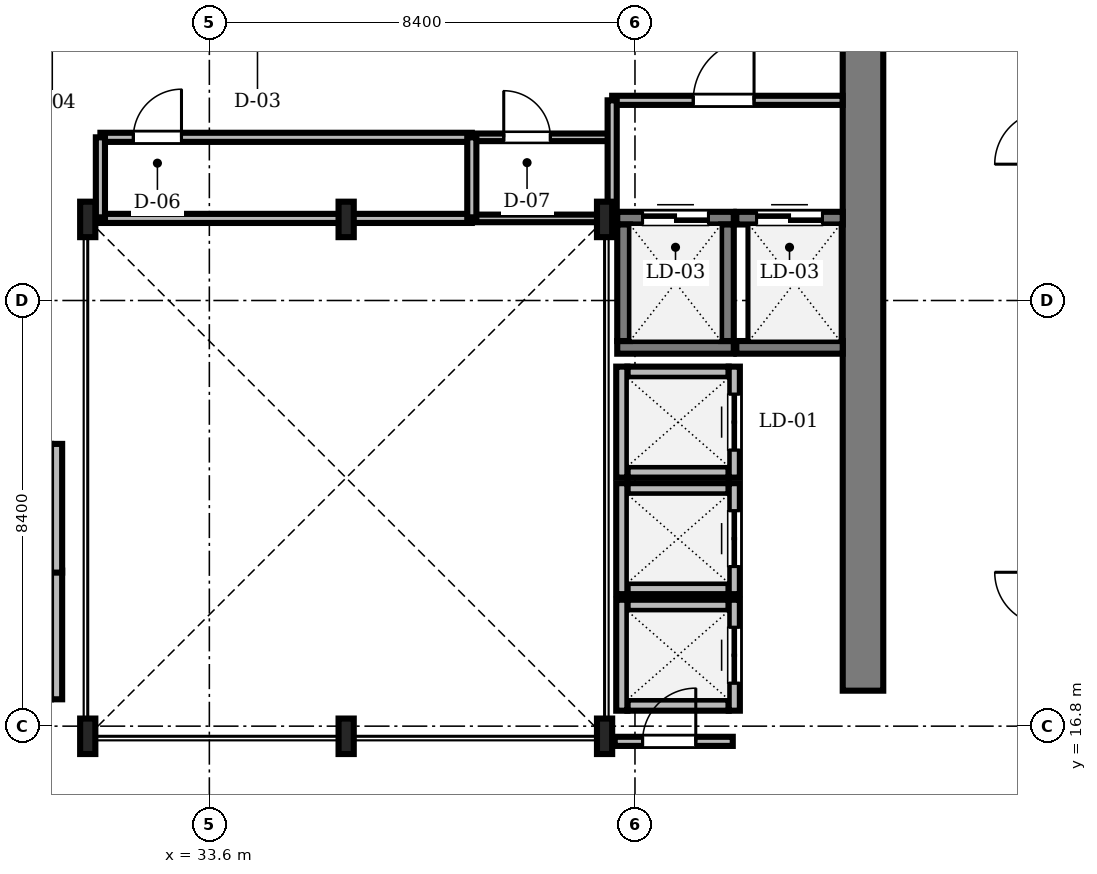
"""IFC4 building model, lengths in metres.
Left out: names, types, materials, properties, quantities, classifications, styles, units other than length and angle.
Written with IfcOpenShell. Run it as: python <this file> out.ifc"""

import sys

from ifc_helpers import new_model, si_unit, direction, frame, frame_2d, origin, origin_2d, place, context, subcontext, project, spatial, rectangle, i_section, extrude, source, transform, mapped, element, fill, save


model = new_model("IFC4")
c1 = context("Model", 3, precision=1e-05, world=origin(), true_north=direction((0.0, 1.0)))
c2 = subcontext(c1, "Body", "Model", "MODEL_VIEW")
j1 = project(units=[si_unit("LENGTHUNIT", "METRE"), si_unit("PLANEANGLEUNIT", "RADIAN")], contexts=[c1])
p1 = place(None, origin())
s1 = spatial("IfcSite", under=j1, at=p1, CompositionType="ELEMENT")
p2 = place(p1, origin())
s2 = spatial("IfcBuilding", under=s1, at=p2, CompositionType="ELEMENT")
p3 = place(p2, frame((0.0, 0.0, 222.3)))
s3 = spatial("IfcBuildingStorey", under=s2, at=p3, CompositionType="ELEMENT", Elevation=222.3)
m1 = source(origin(), c2, "Body", "SweptSolid", [
    extrude(rectangle(XDim=13.15, YDim=0.8, at=frame_2d((6.575, 0.0))), origin(), (0.0, 0.0, 1.0), 3.53),
])
p4 = place(p3, frame((46.5, 17.5, 0.0), z_axis=(0.0, 0.0, 1.0), x_axis=(0.0, 1.0, 0.0)))
e1 = element("IfcWall", 1, at=p4, inside=s3, PredefinedType="SHEAR", context=c2, shape_type="MappedRepresentation", body=[
    mapped(m1, transform((0.0, 0.0, 0.0), scale=1.0)),
])
m2 = source(origin(), c2, "Body", "SweptSolid", [
    extrude(i_section(OverallWidth=0.3, OverallDepth=0.7, WebThickness=0.017, FlangeThickness=0.032, FilletRadius=0.027, at=origin_2d()), origin(), (0.0, 0.0, 1.0), 3.53),
])
for number, where, z_axis, x_axis in (
    (2, (31.2, 16.6, 0.0), (0.0, 0.0, 1.0), (1.0, 0.0, 0.0)),
    (3, (36.3, 16.6, 0.0), (0.0, 0.0, 1.0), (1.0, 0.0, 0.0)),
    (4, (41.4, 16.6, 0.0), (0.0, 0.0, 1.0), (1.0, 0.0, 0.0)),
    (5, (41.4, 26.8, 0.0), (0.0, 0.0, 1.0), (1.0, 0.0, 0.0)),
    (6, (36.3, 26.8, 0.0), (0.0, 0.0, 1.0), (1.0, 0.0, 0.0)),
    (7, (31.2, 26.8, 0.0), (0.0, 0.0, 1.0), (1.0, 0.0, 0.0)),
):
    element("IfcColumn", number, at=place(p3, frame(where, z_axis=z_axis, x_axis=x_axis)), inside=s3, PredefinedType="COLUMN", context=c2, shape_type="MappedRepresentation", body=[
        mapped(m2, transform((0.0, 0.0, 0.0), scale=1.0)),
    ])
m3 = source(origin(), c2, "Body", "SweptSolid", [
    extrude(rectangle(XDim=2.0, YDim=0.22, at=frame_2d((1.0, 0.0))), origin(), (0.0, 0.0, 1.0), 3.53),
])
for number, where, z_axis, x_axis in (
    (8, (41.85, 21.815, 0.0), (0.0, 0.0, 1.0), (1.0, 0.0, 0.0)),
    (9, (41.85, 23.785, 0.0), (0.0, 0.0, 1.0), (1.0, 0.0, 0.0)),
):
    element("IfcWall", number, at=place(p3, frame(where, z_axis=z_axis, x_axis=x_axis)), inside=s3, PredefinedType="SOLIDWALL", context=c2, shape_type="MappedRepresentation", body=[
        mapped(m3, transform((0.0, 0.0, 0.0), scale=1.0)),
    ])
m4 = source(origin(), c2, "Body", "SweptSolid", [
    extrude(rectangle(XDim=2.19, YDim=0.22, at=frame_2d((1.095, 0.0))), origin(), (0.0, 0.0, 1.0), 3.53),
])
p5 = place(p3, frame((41.74, 21.705, 0.0), z_axis=(0.0, 0.0, 1.0), x_axis=(0.0, 1.0, 0.0)))
e10 = element("IfcWall", 10, at=p5, inside=s3, PredefinedType="SOLIDWALL", context=c2, shape_type="MappedRepresentation", body=[
    mapped(m4, transform((0.0, 0.0, 0.0), scale=1.0)),
])
p6 = place(p3, frame((43.96, 21.705, 0.0), z_axis=(0.0, 0.0, 1.0), x_axis=(0.0, 1.0, 0.0)))
e11 = element("IfcWall", 11, at=p6, inside=s3, PredefinedType="SOLIDWALL", context=c2, shape_type="MappedRepresentation", body=[
    mapped(m4, transform((0.0, 0.0, 0.0), scale=1.0)),
])
m5 = source(origin(), c2, "Body", "SweptSolid", [
    extrude(rectangle(XDim=1.1, YDim=2.2, at=frame_2d((0.55, 1.1))), frame((0.0, 0.12, 0.0), z_axis=(0.0, -1.0, 0.0), x_axis=(1.0, 0.0, 0.0)), (0.0, 0.0, 1.0), 0.24),
])
p7 = place(p6, frame((0.545, 0.0, 0.0)))
e12 = element("IfcOpeningElement", 12, at=p7, cuts=e11, PredefinedType="OPENING", context=c2, shape_type="MappedRepresentation", body=[
    mapped(m5, transform((0.0, 0.0, 0.0), scale=1.0)),
])
for number, where, z_axis, x_axis in (
    (13, (41.85, 19.515, 0.0), (0.0, 0.0, 1.0), (1.0, 0.0, 0.0)),
    (14, (41.85, 21.485, 0.0), (0.0, 0.0, 1.0), (1.0, 0.0, 0.0)),
):
    element("IfcWall", number, at=place(p3, frame(where, z_axis=z_axis, x_axis=x_axis)), inside=s3, PredefinedType="SOLIDWALL", context=c2, shape_type="MappedRepresentation", body=[
        mapped(m3, transform((0.0, 0.0, 0.0), scale=1.0)),
    ])
p8 = place(p3, frame((41.74, 19.405, 0.0), z_axis=(0.0, 0.0, 1.0), x_axis=(0.0, 1.0, 0.0)))
e15 = element("IfcWall", 15, at=p8, inside=s3, PredefinedType="SOLIDWALL", context=c2, shape_type="MappedRepresentation", body=[
    mapped(m4, transform((0.0, 0.0, 0.0), scale=1.0)),
])
p9 = place(p3, frame((43.96, 19.405, 0.0), z_axis=(0.0, 0.0, 1.0), x_axis=(0.0, 1.0, 0.0)))
e16 = element("IfcWall", 16, at=p9, inside=s3, PredefinedType="SOLIDWALL", context=c2, shape_type="MappedRepresentation", body=[
    mapped(m4, transform((0.0, 0.0, 0.0), scale=1.0)),
])
p10 = place(p9, frame((0.545, 0.0, 0.0)))
e17 = element("IfcOpeningElement", 17, at=p10, cuts=e16, PredefinedType="OPENING", context=c2, shape_type="MappedRepresentation", body=[
    mapped(m5, transform((0.0, 0.0, 0.0), scale=1.0)),
])
for number, where, z_axis, x_axis in (
    (18, (41.85, 17.215, 0.0), (0.0, 0.0, 1.0), (1.0, 0.0, 0.0)),
    (19, (41.85, 19.185, 0.0), (0.0, 0.0, 1.0), (1.0, 0.0, 0.0)),
):
    element("IfcWall", number, at=place(p3, frame(where, z_axis=z_axis, x_axis=x_axis)), inside=s3, PredefinedType="SOLIDWALL", context=c2, shape_type="MappedRepresentation", body=[
        mapped(m3, transform((0.0, 0.0, 0.0), scale=1.0)),
    ])
p11 = place(p3, frame((41.74, 17.105, 0.0), z_axis=(0.0, 0.0, 1.0), x_axis=(0.0, 1.0, 0.0)))
e20 = element("IfcWall", 20, at=p11, inside=s3, PredefinedType="SOLIDWALL", context=c2, shape_type="MappedRepresentation", body=[
    mapped(m4, transform((0.0, 0.0, 0.0), scale=1.0)),
])
p12 = place(p3, frame((43.96, 17.105, 0.0), z_axis=(0.0, 0.0, 1.0), x_axis=(0.0, 1.0, 0.0)))
e21 = element("IfcWall", 21, at=p12, inside=s3, PredefinedType="SOLIDWALL", context=c2, shape_type="MappedRepresentation", body=[
    mapped(m4, transform((0.0, 0.0, 0.0), scale=1.0)),
])
p13 = place(p12, frame((0.545, 0.0, 0.0)))
e22 = element("IfcOpeningElement", 22, at=p13, cuts=e21, PredefinedType="OPENING", context=c2, shape_type="MappedRepresentation", body=[
    mapped(m5, transform((0.0, 0.0, 0.0), scale=1.0)),
])
m6 = source(origin(), c2, "Body", "SweptSolid", [
    extrude(rectangle(XDim=2.54, YDim=0.22, at=frame_2d((1.27, 0.0))), origin(), (0.0, 0.0, 1.0), 3.53),
])
for number, where, z_axis, x_axis in (
    (23, (30.585, 17.33, 0.0), (0.0, 0.0, 1.0), (0.0, 1.0, 0.0)),
    (24, (30.585, 19.83, 0.0), (0.0, 0.0, 1.0), (0.0, 1.0, 0.0)),
):
    element("IfcWall", number, at=place(p3, frame(where, z_axis=z_axis, x_axis=x_axis)), inside=s3, PredefinedType="SOLIDWALL", context=c2, shape_type="MappedRepresentation", body=[
        mapped(m6, transform((0.0, 0.0, 0.0), scale=1.0)),
    ])
m7 = source(origin(), c2, "Body", "SweptSolid", [
    extrude(rectangle(XDim=2.3, YDim=0.25, at=frame_2d((1.15, 0.0))), origin(), (0.0, 0.0, 1.0), 3.53),
])
p14 = place(p3, frame((41.65, 24.275, 0.0), z_axis=(0.0, 0.0, 1.0), x_axis=(1.0, 0.0, 0.0)))
e25 = element("IfcWall", 25, at=p14, inside=s3, PredefinedType="SOLIDWALL", context=c2, shape_type="MappedRepresentation", body=[
    mapped(m7, transform((0.0, 0.0, 0.0), scale=1.0)),
])
p15 = place(p3, frame((41.65, 26.825, 0.0), z_axis=(0.0, 0.0, 1.0), x_axis=(1.0, 0.0, 0.0)))
e26 = element("IfcWall", 26, at=p15, inside=s3, PredefinedType="SOLIDWALL", context=c2, shape_type="MappedRepresentation", body=[
    mapped(m7, transform((0.0, 0.0, 0.0), scale=1.0)),
])
m8 = source(origin(), c2, "Body", "SweptSolid", [
    extrude(rectangle(XDim=1.3, YDim=2.3, at=frame_2d((0.65, 1.15))), frame((0.0, 0.135, 0.0), z_axis=(0.0, -1.0, 0.0), x_axis=(1.0, 0.0, 0.0)), (0.0, 0.0, 1.0), 0.27),
])
p16 = place(p15, frame((0.5, 0.0, 0.0)))
e27 = element("IfcOpeningElement", 27, at=p16, cuts=e26, PredefinedType="OPENING", context=c2, shape_type="MappedRepresentation", body=[
    mapped(m8, transform((0.0, 0.0, 0.0), scale=1.0)),
])
for number, where, z_axis, x_axis in (
    (28, (41.775, 24.4, 0.0), (0.0, 0.0, 1.0), (0.0, 1.0, 0.0)),
    (29, (43.825, 24.4, 0.0), (0.0, 0.0, 1.0), (0.0, 1.0, 0.0)),
):
    element("IfcWall", number, at=place(p3, frame(where, z_axis=z_axis, x_axis=x_axis)), inside=s3, PredefinedType="SOLIDWALL", context=c2, shape_type="MappedRepresentation", body=[
        mapped(m7, transform((0.0, 0.0, 0.0), scale=1.0)),
    ])
m9 = source(origin(), c2, "Body", "SweptSolid", [
    extrude(rectangle(XDim=2.1, YDim=0.25, at=frame_2d((1.05, 0.0))), origin(), (0.0, 0.0, 1.0), 3.53),
])
p17 = place(p3, frame((44.0, 24.275, 0.0), z_axis=(0.0, 0.0, 1.0), x_axis=(1.0, 0.0, 0.0)))
e30 = element("IfcWall", 30, at=p17, inside=s3, PredefinedType="SOLIDWALL", context=c2, shape_type="MappedRepresentation", body=[
    mapped(m9, transform((0.0, 0.0, 0.0), scale=1.0)),
])
p18 = place(p3, frame((44.0, 26.825, 0.0), z_axis=(0.0, 0.0, 1.0), x_axis=(1.0, 0.0, 0.0)))
e31 = element("IfcWall", 31, at=p18, inside=s3, PredefinedType="SOLIDWALL", context=c2, shape_type="MappedRepresentation", body=[
    mapped(m9, transform((0.0, 0.0, 0.0), scale=1.0)),
])
p19 = place(p18, frame((0.4, 0.0, 0.0)))
e32 = element("IfcOpeningElement", 32, at=p19, cuts=e31, PredefinedType="OPENING", context=c2, shape_type="MappedRepresentation", body=[
    mapped(m8, transform((0.0, 0.0, 0.0), scale=1.0)),
])
m10 = source(origin(), c2, "Body", "SweptSolid", [
    extrude(rectangle(XDim=7.33, YDim=0.18, at=frame_2d((3.665, 0.0))), origin(), (0.0, 0.0, 1.0), 3.162),
])
p20 = place(p3, frame((31.45, 28.42, 0.0), z_axis=(0.0, 0.0, 1.0), x_axis=(1.0, 0.0, 0.0)))
e33 = element("IfcWall", 33, at=p20, inside=s3, PredefinedType="PARTITIONING", context=c2, shape_type="MappedRepresentation", body=[
    mapped(m10, transform((0.0, 0.0, 0.0), scale=1.0)),
])
m11 = source(origin(), c2, "Body", "SweptSolid", [
    extrude(rectangle(XDim=0.95, YDim=2.15, at=frame_2d((0.475, 1.075))), frame((0.0, 0.1, 0.0), z_axis=(0.0, -1.0, 0.0), x_axis=(1.0, 0.0, 0.0)), (0.0, 0.0, 1.0), 0.2),
])
p21 = place(p20, frame((0.65, 0.0, 0.0)))
e34 = element("IfcOpeningElement", 34, at=p21, cuts=e33, PredefinedType="OPENING", context=c2, shape_type="MappedRepresentation", body=[
    mapped(m11, transform((0.0, 0.0, 0.0), scale=1.0)),
])
m12 = source(origin(), c2, "Body", "SweptSolid", [
    extrude(rectangle(XDim=4.548, YDim=0.18, at=frame_2d((2.274, 0.0))), origin(), (0.0, 0.0, 1.0), 3.162),
])
p22 = place(p3, frame((41.55, 29.15, 0.0), z_axis=(0.0, 0.0, 1.0), x_axis=(1.0, 0.0, 0.0)))
e35 = element("IfcWall", 35, at=p22, inside=s3, PredefinedType="PARTITIONING", context=c2, shape_type="MappedRepresentation", body=[
    mapped(m12, transform((0.0, 0.0, 0.0), scale=1.0)),
])
m13 = source(origin(), c2, "Body", "SweptSolid", [
    extrude(rectangle(XDim=1.2, YDim=2.2, at=frame_2d((0.6, 1.1))), frame((0.0, 0.1, 0.0), z_axis=(0.0, -1.0, 0.0), x_axis=(1.0, 0.0, 0.0)), (0.0, 0.0, 1.0), 0.2),
])
p23 = place(p22, frame((1.6, 0.0, 0.0)))
e36 = element("IfcOpeningElement", 36, at=p23, cuts=e35, PredefinedType="OPENING", context=c2, shape_type="MappedRepresentation", body=[
    mapped(m13, transform((0.0, 0.0, 0.0), scale=1.0)),
])
m14 = source(origin(), c2, "Body", "SweptSolid", [
    extrude(rectangle(XDim=2.74, YDim=0.15, at=frame_2d((1.37, 0.0))), origin(), (0.0, 0.0, 1.0), 3.53),
])
p24 = place(p3, frame((38.78, 28.42, 0.0), z_axis=(0.0, 0.0, 1.0), x_axis=(1.0, 0.0, 0.0)))
e37 = element("IfcWall", 37, at=p24, inside=s3, PredefinedType="PARTITIONING", context=c2, shape_type="MappedRepresentation", body=[
    mapped(m14, transform((0.0, 0.0, 0.0), scale=1.0)),
])
m15 = source(origin(), c2, "Body", "SweptSolid", [
    extrude(rectangle(XDim=0.92, YDim=2.1, at=frame_2d((0.46, 1.05))), frame((0.0, 0.085, 0.0), z_axis=(0.0, -1.0, 0.0), x_axis=(1.0, 0.0, 0.0)), (0.0, 0.0, 1.0), 0.17),
])
p25 = place(p24, frame((0.63, 0.0, 0.0)))
e38 = element("IfcOpeningElement", 38, at=p25, cuts=e37, PredefinedType="OPENING", context=c2, shape_type="MappedRepresentation", body=[
    mapped(m15, transform((0.0, 0.0, 0.0), scale=1.0)),
])
m16 = source(origin(), c2, "Body", "SweptSolid", [
    extrude(rectangle(XDim=2.33, YDim=0.18, at=frame_2d((1.165, 0.0))), origin(), (0.0, 0.0, 1.0), 2.972),
])
p26 = place(p3, frame((41.6, 16.5, 0.0), z_axis=(0.0, 0.0, 1.0), x_axis=(1.0, 0.0, 0.0)))
e39 = element("IfcWall", 39, at=p26, inside=s3, PredefinedType="PARTITIONING", context=c2, shape_type="MappedRepresentation", body=[
    mapped(m16, transform((0.0, 0.0, 0.0), scale=1.0)),
])
m17 = source(origin(), c2, "Body", "SweptSolid", [
    extrude(rectangle(XDim=1.05, YDim=2.2, at=frame_2d((0.525, 1.1))), frame((0.0, 0.1, 0.0), z_axis=(0.0, -1.0, 0.0), x_axis=(1.0, 0.0, 0.0)), (0.0, 0.0, 1.0), 0.2),
])
p27 = place(p26, frame((0.55, 0.0, 0.0)))
e40 = element("IfcOpeningElement", 40, at=p27, cuts=e39, PredefinedType="OPENING", context=c2, shape_type="MappedRepresentation", body=[
    mapped(m17, transform((0.0, 0.0, 0.0), scale=1.0)),
])
m18 = source(origin(), c2, "Body", "SweptSolid", [
    extrude(rectangle(XDim=7.33, YDim=0.18, at=frame_2d((3.665, 0.0))), origin(), (0.0, 0.0, 1.0), 3.072),
])
p28 = place(p3, frame((31.45, 26.82, 0.0), z_axis=(0.0, 0.0, 1.0), x_axis=(1.0, 0.0, 0.0)))
e41 = element("IfcWall", 41, at=p28, inside=s3, PredefinedType="PARTITIONING", context=c2, shape_type="MappedRepresentation", body=[
    mapped(m18, transform((0.0, 0.0, 0.0), scale=1.0)),
])
m19 = source(origin(), c2, "Body", "SweptSolid", [
    extrude(rectangle(XDim=2.74, YDim=0.15, at=frame_2d((1.37, 0.0))), origin(), (0.0, 0.0, 1.0), 2.972),
])
p29 = place(p3, frame((38.78, 26.82, 0.0), z_axis=(0.0, 0.0, 1.0), x_axis=(1.0, 0.0, 0.0)))
e42 = element("IfcWall", 42, at=p29, inside=s3, PredefinedType="PARTITIONING", context=c2, shape_type="MappedRepresentation", body=[
    mapped(m19, transform((0.0, 0.0, 0.0), scale=1.0)),
])
m20 = source(origin(), c2, "Body", "SweptSolid", [
    extrude(rectangle(XDim=2.35, YDim=0.18, at=frame_2d((1.175, 0.0))), origin(), (0.0, 0.0, 1.0), 2.972),
])
p30 = place(p3, frame((41.55, 26.8, 0.0), z_axis=(0.0, 0.0, 1.0), x_axis=(0.0, 1.0, 0.0)))
e43 = element("IfcWall", 43, at=p30, inside=s3, PredefinedType="PARTITIONING", context=c2, shape_type="MappedRepresentation", body=[
    mapped(m20, transform((0.0, 0.0, 0.0), scale=1.0)),
])
m21 = source(origin(), c2, "Body", "SweptSolid", [
    extrude(rectangle(XDim=1.6, YDim=0.18, at=frame_2d((0.8, 0.0))), origin(), (0.0, 0.0, 1.0), 3.072),
])
for number, where, z_axis, x_axis in (
    (44, (31.45, 26.82, 0.0), (0.0, 0.0, 1.0), (0.0, 1.0, 0.0)),
    (45, (38.78, 26.82, 0.0), (0.0, 0.0, 1.0), (0.0, 1.0, 0.0)),
):
    element("IfcWall", number, at=place(p3, frame(where, z_axis=z_axis, x_axis=x_axis)), inside=s3, PredefinedType="PARTITIONING", context=c2, shape_type="MappedRepresentation", body=[
        mapped(m21, transform((0.0, 0.0, 0.0), scale=1.0)),
    ])
m22 = source(origin(), c2, "Body", "SweptSolid", [
    extrude(rectangle(XDim=1.1, YDim=2.2, at=frame_2d((0.55, 1.1))), frame((0.0, 0.025, 0.0), z_axis=(0.0, -1.0, 0.0), x_axis=(1.0, 0.0, 0.0)), (0.0, 0.0, 1.0), 0.05),
])
p31 = place(p7, origin())
e46 = element("IfcDoor", 46, at=p31, inside=s3, OperationType="DOUBLE_DOOR_SLIDING", PredefinedType="DOOR", context=c2, shape_type="MappedRepresentation", body=[
    mapped(m22, transform((0.0, 0.0, 0.0), scale=1.0)),
])
fill(e12, e46)
p32 = place(p10, origin())
e47 = element("IfcDoor", 47, at=p32, inside=s3, OperationType="DOUBLE_DOOR_SLIDING", PredefinedType="DOOR", context=c2, shape_type="MappedRepresentation", body=[
    mapped(m22, transform((0.0, 0.0, 0.0), scale=1.0)),
])
fill(e17, e47)
p33 = place(p13, origin())
e48 = element("IfcDoor", 48, at=p33, inside=s3, OperationType="DOUBLE_DOOR_SLIDING", PredefinedType="DOOR", context=c2, shape_type="MappedRepresentation", body=[
    mapped(m22, transform((0.0, 0.0, 0.0), scale=1.0)),
])
fill(e22, e48)
m23 = source(origin(), c2, "Body", "SweptSolid", [
    extrude(rectangle(XDim=1.3, YDim=2.3, at=frame_2d((0.65, 1.15))), frame((0.0, 0.025, 0.0), z_axis=(0.0, -1.0, 0.0), x_axis=(1.0, 0.0, 0.0)), (0.0, 0.0, 1.0), 0.05),
])
p34 = place(p16, origin())
e49 = element("IfcDoor", 49, at=p34, inside=s3, OperationType="DOUBLE_DOOR_SLIDING", PredefinedType="DOOR", context=c2, shape_type="MappedRepresentation", body=[
    mapped(m23, transform((0.0, 0.0, 0.0), scale=1.0)),
])
fill(e27, e49)
p35 = place(p19, origin())
e50 = element("IfcDoor", 50, at=p35, inside=s3, OperationType="DOUBLE_DOOR_SLIDING", PredefinedType="DOOR", context=c2, shape_type="MappedRepresentation", body=[
    mapped(m23, transform((0.0, 0.0, 0.0), scale=1.0)),
])
fill(e32, e50)
m24 = source(origin(), c2, "Body", "SweptSolid", [
    extrude(rectangle(XDim=0.95, YDim=2.15, at=frame_2d((0.475, 1.075))), frame((0.0, 0.025, 0.0), z_axis=(0.0, -1.0, 0.0), x_axis=(1.0, 0.0, 0.0)), (0.0, 0.0, 1.0), 0.05),
])
p36 = place(p21, origin())
e51 = element("IfcDoor", 51, at=p36, inside=s3, OperationType="SINGLE_SWING_RIGHT", PredefinedType="DOOR", context=c2, shape_type="MappedRepresentation", body=[
    mapped(m24, transform((0.0, 0.0, 0.0), scale=1.0)),
])
fill(e34, e51)
m25 = source(origin(), c2, "Body", "SweptSolid", [
    extrude(rectangle(XDim=1.2, YDim=2.2, at=frame_2d((0.6, 1.1))), frame((0.0, 0.025, 0.0), z_axis=(0.0, -1.0, 0.0), x_axis=(1.0, 0.0, 0.0)), (0.0, 0.0, 1.0), 0.05),
])
p37 = place(p23, origin())
e52 = element("IfcDoor", 52, at=p37, inside=s3, OperationType="SINGLE_SWING_RIGHT", PredefinedType="DOOR", context=c2, shape_type="MappedRepresentation", body=[
    mapped(m25, transform((0.0, 0.0, 0.0), scale=1.0)),
])
fill(e36, e52)
m26 = source(origin(), c2, "Body", "SweptSolid", [
    extrude(rectangle(XDim=0.92, YDim=2.1, at=frame_2d((0.46, 1.05))), frame((0.0, 0.025, 0.0), z_axis=(0.0, -1.0, 0.0), x_axis=(1.0, 0.0, 0.0)), (0.0, 0.0, 1.0), 0.05),
])
p38 = place(p25, origin())
e53 = element("IfcDoor", 53, at=p38, inside=s3, OperationType="SINGLE_SWING_LEFT", PredefinedType="DOOR", context=c2, shape_type="MappedRepresentation", body=[
    mapped(m26, transform((0.0, 0.0, 0.0), scale=1.0)),
])
fill(e38, e53)
m27 = source(origin(), c2, "Body", "SweptSolid", [
    extrude(rectangle(XDim=1.05, YDim=2.2, at=frame_2d((0.525, 1.1))), frame((0.0, 0.025, 0.0), z_axis=(0.0, -1.0, 0.0), x_axis=(1.0, 0.0, 0.0)), (0.0, 0.0, 1.0), 0.05),
])
p39 = place(p27, origin())
e54 = element("IfcDoor", 54, at=p39, inside=s3, OperationType="SINGLE_SWING_RIGHT", PredefinedType="DOOR", context=c2, shape_type="MappedRepresentation", body=[
    mapped(m27, transform((0.0, 0.0, 0.0), scale=1.0)),
])
fill(e40, e54)
save(model, sys.argv[1])
